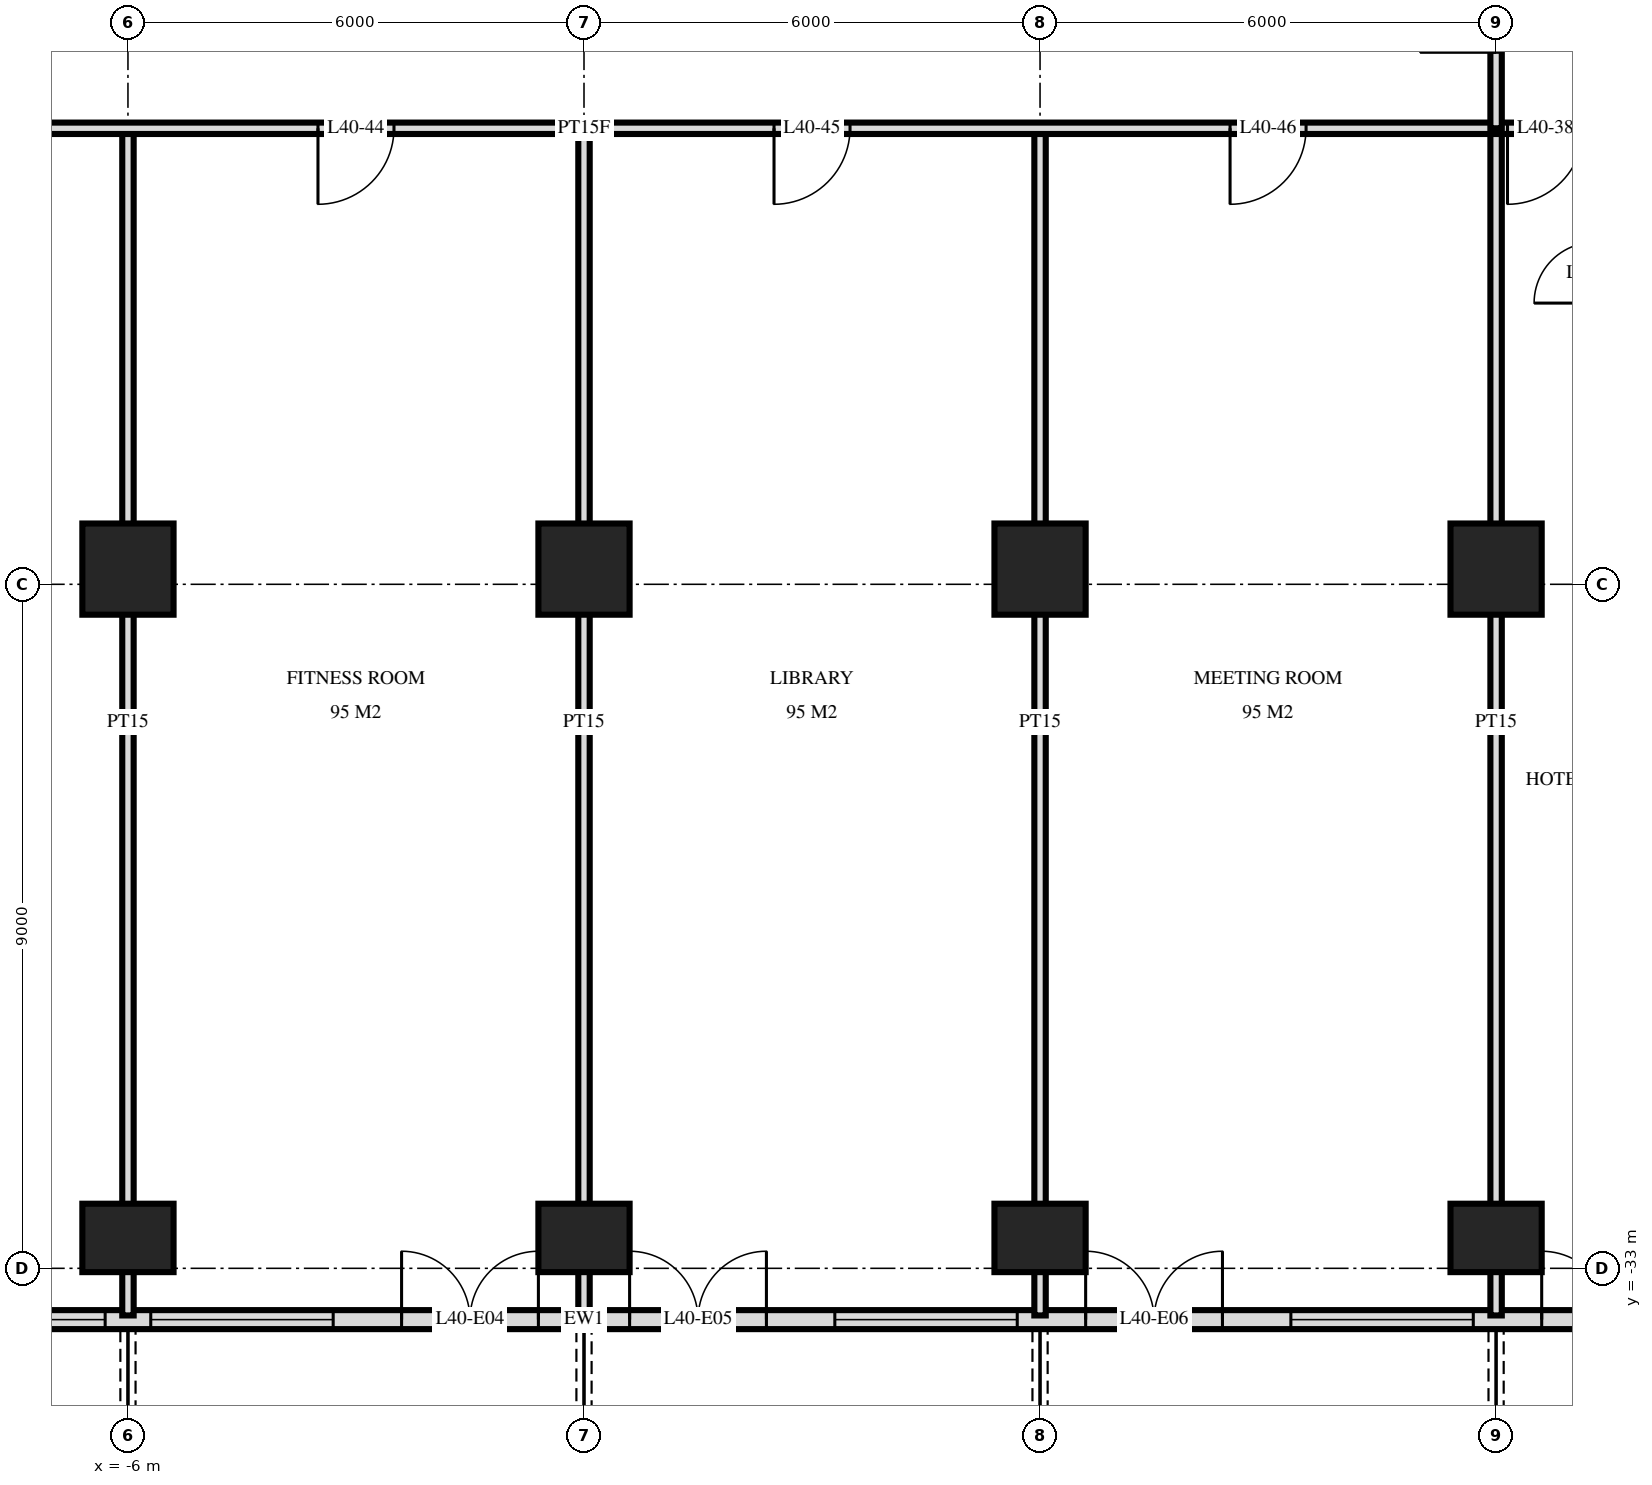
"""IFC4 building model, lengths in metres.
Left out: names, types, materials, properties, quantities, classifications, styles, units other than length and angle.
Written with IfcOpenShell. Run it as: python <this file> out.ifc"""

import sys

from ifc_helpers import new_model, si_unit, direction, frame, frame_2d, origin, origin_2d, place, context, subcontext, project, spatial, rectangle, extrude, element, fill, save


model = new_model("IFC4")
c1 = context("Model", 3, precision=1e-05, world=origin(), true_north=direction((0.0, 1.0)))
c2 = subcontext(c1, "Body", "Model", "MODEL_VIEW")
j1 = project(units=[si_unit("LENGTHUNIT", "METRE"), si_unit("PLANEANGLEUNIT", "RADIAN")], contexts=[c1])
p1 = place(None, origin())
s1 = spatial("IfcSite", under=j1, at=p1, CompositionType="ELEMENT")
p2 = place(p1, origin())
s2 = spatial("IfcBuilding", under=s1, at=p2, CompositionType="ELEMENT")
p3 = place(p2, frame((0.0, 0.0, 156.0)))
s3 = spatial("IfcBuildingStorey", under=s2, at=p3, CompositionType="ELEMENT", Elevation=156.0)
p4 = place(p3, frame((-6.0, -32.6, 0.0), z_axis=(0.0, 0.0, 1.0), x_axis=(1.0, 0.0, 0.0)))
e1 = element("IfcColumn", 1, at=p4, inside=s3, PredefinedType="COLUMN", context=c2, shape_type="SweptSolid", body=[
    extrude(rectangle(XDim=1.2, YDim=0.9, at=origin_2d()), origin(), (0.0, 0.0, 1.0), 3.6),
])
p5 = place(p3, frame((-6.0, -23.8, 0.0), z_axis=(0.0, 0.0, 1.0), x_axis=(1.0, 0.0, 0.0)))
e2 = element("IfcColumn", 2, at=p5, inside=s3, PredefinedType="COLUMN", context=c2, shape_type="SweptSolid", body=[
    extrude(rectangle(XDim=1.2, YDim=1.2, at=origin_2d()), origin(), (0.0, 0.0, 1.0), 3.6),
])
p6 = place(p3, frame((0.0, -32.6, 0.0), z_axis=(0.0, 0.0, 1.0), x_axis=(1.0, 0.0, 0.0)))
e3 = element("IfcColumn", 3, at=p6, inside=s3, PredefinedType="COLUMN", context=c2, shape_type="SweptSolid", body=[
    extrude(rectangle(XDim=1.2, YDim=0.9, at=origin_2d()), origin(), (0.0, 0.0, 1.0), 3.6),
])
p7 = place(p3, frame((0.0, -23.8, 0.0), z_axis=(0.0, 0.0, 1.0), x_axis=(1.0, 0.0, 0.0)))
e4 = element("IfcColumn", 4, at=p7, inside=s3, PredefinedType="COLUMN", context=c2, shape_type="SweptSolid", body=[
    extrude(rectangle(XDim=1.2, YDim=1.2, at=origin_2d()), origin(), (0.0, 0.0, 1.0), 3.6),
])
p8 = place(p3, frame((6.0, -32.6, 0.0), z_axis=(0.0, 0.0, 1.0), x_axis=(1.0, 0.0, 0.0)))
e5 = element("IfcColumn", 5, at=p8, inside=s3, PredefinedType="COLUMN", context=c2, shape_type="SweptSolid", body=[
    extrude(rectangle(XDim=1.2, YDim=0.9, at=origin_2d()), origin(), (0.0, 0.0, 1.0), 3.6),
])
p9 = place(p3, frame((6.0, -23.8, 0.0), z_axis=(0.0, 0.0, 1.0), x_axis=(1.0, 0.0, 0.0)))
e6 = element("IfcColumn", 6, at=p9, inside=s3, PredefinedType="COLUMN", context=c2, shape_type="SweptSolid", body=[
    extrude(rectangle(XDim=1.2, YDim=1.2, at=origin_2d()), origin(), (0.0, 0.0, 1.0), 3.6),
])
p10 = place(p3, frame((12.0, -32.6, 0.0), z_axis=(0.0, 0.0, 1.0), x_axis=(1.0, 0.0, 0.0)))
e7 = element("IfcColumn", 7, at=p10, inside=s3, PredefinedType="COLUMN", context=c2, shape_type="SweptSolid", body=[
    extrude(rectangle(XDim=1.2, YDim=0.9, at=origin_2d()), origin(), (0.0, 0.0, 1.0), 3.6),
])
p11 = place(p3, frame((12.0, -23.8, 0.0), z_axis=(0.0, 0.0, 1.0), x_axis=(1.0, 0.0, 0.0)))
e8 = element("IfcColumn", 8, at=p11, inside=s3, PredefinedType="COLUMN", context=c2, shape_type="SweptSolid", body=[
    extrude(rectangle(XDim=1.2, YDim=1.2, at=origin_2d()), origin(), (0.0, 0.0, 1.0), 3.6),
])
p12 = place(p3, frame((-23.675, -33.675, 0.0), z_axis=(0.0, 0.0, 1.0), x_axis=(1.0, 0.0, 0.0)))
e9 = element("IfcWall", 9, at=p12, inside=s3, PredefinedType="SOLIDWALL", context=c2, shape_type="SweptSolid", body=[
    extrude(rectangle(XDim=47.351, YDim=0.25, at=frame_2d((23.675, 0.0))), origin(), (0.0, 0.0, 1.0), 3.32),
])
p13 = place(p12, frame((0.275, 0.0, 0.3)))
e10 = element("IfcOpeningElement", 10, at=p13, cuts=e9, PredefinedType="OPENING", context=c2, shape_type="SweptSolid", body=[
    extrude(rectangle(XDim=2.4, YDim=2.1, at=frame_2d((1.2, 1.05))), frame((0.0, 0.135, 0.0), z_axis=(0.0, -1.0, 0.0), x_axis=(1.0, 0.0, 0.0)), (0.0, 0.0, 1.0), 0.27),
])
p14 = place(p12, frame((3.425, 0.0, 0.0)))
e11 = element("IfcOpeningElement", 11, at=p14, cuts=e9, PredefinedType="OPENING", context=c2, shape_type="SweptSolid", body=[
    extrude(rectangle(XDim=1.8, YDim=2.4, at=frame_2d((0.9, 1.2))), frame((0.0, 0.135, 0.0), z_axis=(0.0, -1.0, 0.0), x_axis=(1.0, 0.0, 0.0)), (0.0, 0.0, 1.0), 0.27),
])
p15 = place(p12, frame((7.775, 0.0, 0.0)))
e12 = element("IfcOpeningElement", 12, at=p15, cuts=e9, PredefinedType="OPENING", context=c2, shape_type="SweptSolid", body=[
    extrude(rectangle(XDim=1.8, YDim=2.4, at=frame_2d((0.9, 1.2))), frame((0.0, 0.135, 0.0), z_axis=(0.0, -1.0, 0.0), x_axis=(1.0, 0.0, 0.0)), (0.0, 0.0, 1.0), 0.27),
])
p16 = place(p12, frame((12.275, 0.0, 0.0)))
e13 = element("IfcOpeningElement", 13, at=p16, cuts=e9, PredefinedType="OPENING", context=c2, shape_type="SweptSolid", body=[
    extrude(rectangle(XDim=1.8, YDim=2.4, at=frame_2d((0.9, 1.2))), frame((0.0, 0.135, 0.0), z_axis=(0.0, -1.0, 0.0), x_axis=(1.0, 0.0, 0.0)), (0.0, 0.0, 1.0), 0.27),
])
p17 = place(p12, frame((14.975, 0.0, 0.3)))
e14 = element("IfcOpeningElement", 14, at=p17, cuts=e9, PredefinedType="OPENING", context=c2, shape_type="SweptSolid", body=[
    extrude(rectangle(XDim=2.4, YDim=2.1, at=frame_2d((1.2, 1.05))), frame((0.0, 0.135, 0.0), z_axis=(0.0, -1.0, 0.0), x_axis=(1.0, 0.0, 0.0)), (0.0, 0.0, 1.0), 0.27),
])
p18 = place(p12, frame((17.975, 0.0, 0.3)))
e15 = element("IfcOpeningElement", 15, at=p18, cuts=e9, PredefinedType="OPENING", context=c2, shape_type="SweptSolid", body=[
    extrude(rectangle(XDim=2.4, YDim=2.1, at=frame_2d((1.2, 1.05))), frame((0.0, 0.135, 0.0), z_axis=(0.0, -1.0, 0.0), x_axis=(1.0, 0.0, 0.0)), (0.0, 0.0, 1.0), 0.27),
])
p19 = place(p12, frame((21.275, 0.0, 0.0)))
e16 = element("IfcOpeningElement", 16, at=p19, cuts=e9, PredefinedType="OPENING", context=c2, shape_type="SweptSolid", body=[
    extrude(rectangle(XDim=1.8, YDim=2.4, at=frame_2d((0.9, 1.2))), frame((0.0, 0.135, 0.0), z_axis=(0.0, -1.0, 0.0), x_axis=(1.0, 0.0, 0.0)), (0.0, 0.0, 1.0), 0.27),
])
p20 = place(p12, frame((24.275, 0.0, 0.0)))
e17 = element("IfcOpeningElement", 17, at=p20, cuts=e9, PredefinedType="OPENING", context=c2, shape_type="SweptSolid", body=[
    extrude(rectangle(XDim=1.8, YDim=2.4, at=frame_2d((0.9, 1.2))), frame((0.0, 0.135, 0.0), z_axis=(0.0, -1.0, 0.0), x_axis=(1.0, 0.0, 0.0)), (0.0, 0.0, 1.0), 0.27),
])
p21 = place(p12, frame((26.975, 0.0, 0.3)))
e18 = element("IfcOpeningElement", 18, at=p21, cuts=e9, PredefinedType="OPENING", context=c2, shape_type="SweptSolid", body=[
    extrude(rectangle(XDim=2.4, YDim=2.1, at=frame_2d((1.2, 1.05))), frame((0.0, 0.135, 0.0), z_axis=(0.0, -1.0, 0.0), x_axis=(1.0, 0.0, 0.0)), (0.0, 0.0, 1.0), 0.27),
])
p22 = place(p12, frame((30.275, 0.0, 0.0)))
e19 = element("IfcOpeningElement", 19, at=p22, cuts=e9, PredefinedType="OPENING", context=c2, shape_type="SweptSolid", body=[
    extrude(rectangle(XDim=1.8, YDim=2.4, at=frame_2d((0.9, 1.2))), frame((0.0, 0.135, 0.0), z_axis=(0.0, -1.0, 0.0), x_axis=(1.0, 0.0, 0.0)), (0.0, 0.0, 1.0), 0.27),
])
p23 = place(p12, frame((32.975, 0.0, 0.3)))
e20 = element("IfcOpeningElement", 20, at=p23, cuts=e9, PredefinedType="OPENING", context=c2, shape_type="SweptSolid", body=[
    extrude(rectangle(XDim=2.4, YDim=2.1, at=frame_2d((1.2, 1.05))), frame((0.0, 0.135, 0.0), z_axis=(0.0, -1.0, 0.0), x_axis=(1.0, 0.0, 0.0)), (0.0, 0.0, 1.0), 0.27),
])
p24 = place(p12, frame((36.275, 0.0, 0.0)))
e21 = element("IfcOpeningElement", 21, at=p24, cuts=e9, PredefinedType="OPENING", context=c2, shape_type="SweptSolid", body=[
    extrude(rectangle(XDim=1.8, YDim=2.4, at=frame_2d((0.9, 1.2))), frame((0.0, 0.135, 0.0), z_axis=(0.0, -1.0, 0.0), x_axis=(1.0, 0.0, 0.0)), (0.0, 0.0, 1.0), 0.27),
])
p25 = place(p12, frame((38.975, 0.0, 0.3)))
e22 = element("IfcOpeningElement", 22, at=p25, cuts=e9, PredefinedType="OPENING", context=c2, shape_type="SweptSolid", body=[
    extrude(rectangle(XDim=2.4, YDim=2.1, at=frame_2d((1.2, 1.05))), frame((0.0, 0.135, 0.0), z_axis=(0.0, -1.0, 0.0), x_axis=(1.0, 0.0, 0.0)), (0.0, 0.0, 1.0), 0.27),
])
p26 = place(p12, frame((41.975, 0.0, 0.3)))
e23 = element("IfcOpeningElement", 23, at=p26, cuts=e9, PredefinedType="OPENING", context=c2, shape_type="SweptSolid", body=[
    extrude(rectangle(XDim=2.4, YDim=2.1, at=frame_2d((1.2, 1.05))), frame((0.0, 0.135, 0.0), z_axis=(0.0, -1.0, 0.0), x_axis=(1.0, 0.0, 0.0)), (0.0, 0.0, 1.0), 0.27),
])
p27 = place(p12, frame((45.125, 0.0, 0.0)))
e24 = element("IfcOpeningElement", 24, at=p27, cuts=e9, PredefinedType="OPENING", context=c2, shape_type="SweptSolid", body=[
    extrude(rectangle(XDim=1.8, YDim=2.4, at=frame_2d((0.9, 1.2))), frame((0.0, 0.135, 0.0), z_axis=(0.0, -1.0, 0.0), x_axis=(1.0, 0.0, 0.0)), (0.0, 0.0, 1.0), 0.27),
])
p28 = place(p3, frame((12.0, -18.0, 0.0), z_axis=(0.0, 0.0, 1.0), x_axis=(0.0, 1.0, 0.0)))
e25 = element("IfcWall", 25, at=p28, inside=s3, PredefinedType="PARTITIONING", context=c2, shape_type="SweptSolid", body=[
    extrude(rectangle(XDim=2.95, YDim=0.15, at=frame_2d((1.475, 0.0))), origin(), (0.0, 0.0, 1.0), 3.32),
])
p29 = place(p28, frame((1.0, 0.0, 0.0)))
e26 = element("IfcOpeningElement", 26, at=p29, cuts=e25, PredefinedType="OPENING", context=c2, shape_type="SweptSolid", body=[
    extrude(rectangle(XDim=1.0, YDim=2.1, at=frame_2d((0.5, 1.05))), frame((0.0, 0.085, 0.0), z_axis=(0.0, -1.0, 0.0), x_axis=(1.0, 0.0, 0.0)), (0.0, 0.0, 1.0), 0.17),
])
for number, where, z_axis, x_axis in (
    (27, (12.0, -33.62, 0.0), (0.0, 0.0, 1.0), (0.0, 1.0, 0.0)),
    (28, (6.0, -33.62, 0.0), (0.0, 0.0, 1.0), (0.0, 1.0, 0.0)),
    (29, (0.0, -33.62, 0.0), (0.0, 0.0, 1.0), (0.0, 1.0, 0.0)),
    (30, (-6.0, -33.62, 0.0), (0.0, 0.0, 1.0), (0.0, 1.0, 0.0)),
):
    element("IfcWall", number, at=place(p3, frame(where, z_axis=z_axis, x_axis=x_axis)), inside=s3, PredefinedType="PARTITIONING", context=c2, shape_type="SweptSolid", body=[
        extrude(rectangle(XDim=15.62, YDim=0.15, at=frame_2d((7.81, 0.0))), origin(), (0.0, 0.0, 1.0), 3.32),
    ])
p30 = place(p3, frame((-28.02, -18.0, 0.0), z_axis=(0.0, 0.0, 1.0), x_axis=(1.0, 0.0, 0.0)))
e31 = element("IfcWall", 31, at=p30, inside=s3, PredefinedType="PARTITIONING", context=c2, shape_type="SweptSolid", body=[
    extrude(rectangle(XDim=56.04, YDim=0.15, at=frame_2d((28.02, 0.0))), origin(), (0.0, 0.0, 1.0), 3.32),
])
p31 = place(p30, frame((12.52, 0.0, 0.0)))
e32 = element("IfcOpeningElement", 32, at=p31, cuts=e31, PredefinedType="OPENING", context=c2, shape_type="SweptSolid", body=[
    extrude(rectangle(XDim=1.0, YDim=2.1, at=frame_2d((0.5, 1.05))), frame((0.0, 0.085, 0.0), z_axis=(0.0, -1.0, 0.0), x_axis=(1.0, 0.0, 0.0)), (0.0, 0.0, 1.0), 0.17),
])
p32 = place(p30, frame((8.32, 0.0, 0.0)))
e33 = element("IfcOpeningElement", 33, at=p32, cuts=e31, PredefinedType="OPENING", context=c2, shape_type="SweptSolid", body=[
    extrude(rectangle(XDim=1.0, YDim=2.1, at=frame_2d((0.5, 1.05))), frame((0.0, 0.085, 0.0), z_axis=(0.0, -1.0, 0.0), x_axis=(1.0, 0.0, 0.0)), (0.0, 0.0, 1.0), 0.17),
])
p33 = place(p30, frame((40.17, 0.0, 0.0)))
e34 = element("IfcOpeningElement", 34, at=p33, cuts=e31, PredefinedType="OPENING", context=c2, shape_type="SweptSolid", body=[
    extrude(rectangle(XDim=1.0, YDim=2.1, at=frame_2d((0.5, 1.05))), frame((0.0, 0.085, 0.0), z_axis=(0.0, -1.0, 0.0), x_axis=(1.0, 0.0, 0.0)), (0.0, 0.0, 1.0), 0.17),
])
p34 = place(p30, frame((44.87, 0.0, 0.0)))
e35 = element("IfcOpeningElement", 35, at=p34, cuts=e31, PredefinedType="OPENING", context=c2, shape_type="SweptSolid", body=[
    extrude(rectangle(XDim=1.0, YDim=2.1, at=frame_2d((0.5, 1.05))), frame((0.0, 0.085, 0.0), z_axis=(0.0, -1.0, 0.0), x_axis=(1.0, 0.0, 0.0)), (0.0, 0.0, 1.0), 0.17),
])
p35 = place(p30, frame((46.72, 0.0, 0.0)))
e36 = element("IfcOpeningElement", 36, at=p35, cuts=e31, PredefinedType="OPENING", context=c2, shape_type="SweptSolid", body=[
    extrude(rectangle(XDim=1.0, YDim=2.1, at=frame_2d((0.5, 1.05))), frame((0.0, 0.085, 0.0), z_axis=(0.0, -1.0, 0.0), x_axis=(1.0, 0.0, 0.0)), (0.0, 0.0, 1.0), 0.17),
])
p36 = place(p30, frame((18.52, 0.0, 0.0)))
e37 = element("IfcOpeningElement", 37, at=p36, cuts=e31, PredefinedType="OPENING", context=c2, shape_type="SweptSolid", body=[
    extrude(rectangle(XDim=1.0, YDim=2.1, at=frame_2d((0.5, 1.05))), frame((0.0, 0.085, 0.0), z_axis=(0.0, -1.0, 0.0), x_axis=(1.0, 0.0, 0.0)), (0.0, 0.0, 1.0), 0.17),
])
p37 = place(p30, frame((24.52, 0.0, 0.0)))
e38 = element("IfcOpeningElement", 38, at=p37, cuts=e31, PredefinedType="OPENING", context=c2, shape_type="SweptSolid", body=[
    extrude(rectangle(XDim=1.0, YDim=2.1, at=frame_2d((0.5, 1.05))), frame((0.0, 0.085, 0.0), z_axis=(0.0, -1.0, 0.0), x_axis=(1.0, 0.0, 0.0)), (0.0, 0.0, 1.0), 0.17),
])
p38 = place(p30, frame((30.52, 0.0, 0.0)))
e39 = element("IfcOpeningElement", 39, at=p38, cuts=e31, PredefinedType="OPENING", context=c2, shape_type="SweptSolid", body=[
    extrude(rectangle(XDim=1.0, YDim=2.1, at=frame_2d((0.5, 1.05))), frame((0.0, 0.085, 0.0), z_axis=(0.0, -1.0, 0.0), x_axis=(1.0, 0.0, 0.0)), (0.0, 0.0, 1.0), 0.17),
])
p39 = place(p30, frame((36.52, 0.0, 0.0)))
e40 = element("IfcOpeningElement", 40, at=p39, cuts=e31, PredefinedType="OPENING", context=c2, shape_type="SweptSolid", body=[
    extrude(rectangle(XDim=1.0, YDim=2.1, at=frame_2d((0.5, 1.05))), frame((0.0, 0.085, 0.0), z_axis=(0.0, -1.0, 0.0), x_axis=(1.0, 0.0, 0.0)), (0.0, 0.0, 1.0), 0.17),
])
p40 = place(p17, origin())
e41 = element("IfcWindow", 41, at=p40, inside=s3, PartitioningType="SINGLE_PANEL", PredefinedType="WINDOW", context=c2, shape_type="SweptSolid", body=[
    extrude(rectangle(XDim=2.4, YDim=2.1, at=frame_2d((1.2, 1.05))), frame((0.0, 0.03, 0.0), z_axis=(0.0, -1.0, 0.0), x_axis=(1.0, 0.0, 0.0)), (0.0, 0.0, 1.0), 0.06),
])
fill(e14, e41)
p41 = place(p18, origin())
e42 = element("IfcWindow", 42, at=p41, inside=s3, PartitioningType="SINGLE_PANEL", PredefinedType="WINDOW", context=c2, shape_type="SweptSolid", body=[
    extrude(rectangle(XDim=2.4, YDim=2.1, at=frame_2d((1.2, 1.05))), frame((0.0, 0.03, 0.0), z_axis=(0.0, -1.0, 0.0), x_axis=(1.0, 0.0, 0.0)), (0.0, 0.0, 1.0), 0.06),
])
fill(e15, e42)
p42 = place(p19, origin())
e43 = element("IfcDoor", 43, at=p42, inside=s3, OperationType="DOUBLE_DOOR_SINGLE_SWING", PredefinedType="DOOR", context=c2, shape_type="SweptSolid", body=[
    extrude(rectangle(XDim=1.8, YDim=2.4, at=frame_2d((0.9, 1.2))), frame((0.0, 0.025, 0.0), z_axis=(0.0, -1.0, 0.0), x_axis=(1.0, 0.0, 0.0)), (0.0, 0.0, 1.0), 0.05),
])
fill(e16, e43)
p43 = place(p20, origin())
e44 = element("IfcDoor", 44, at=p43, inside=s3, OperationType="DOUBLE_DOOR_SINGLE_SWING", PredefinedType="DOOR", context=c2, shape_type="SweptSolid", body=[
    extrude(rectangle(XDim=1.8, YDim=2.4, at=frame_2d((0.9, 1.2))), frame((0.0, 0.025, 0.0), z_axis=(0.0, -1.0, 0.0), x_axis=(1.0, 0.0, 0.0)), (0.0, 0.0, 1.0), 0.05),
])
fill(e17, e44)
p44 = place(p21, origin())
e45 = element("IfcWindow", 45, at=p44, inside=s3, PartitioningType="SINGLE_PANEL", PredefinedType="WINDOW", context=c2, shape_type="SweptSolid", body=[
    extrude(rectangle(XDim=2.4, YDim=2.1, at=frame_2d((1.2, 1.05))), frame((0.0, 0.03, 0.0), z_axis=(0.0, -1.0, 0.0), x_axis=(1.0, 0.0, 0.0)), (0.0, 0.0, 1.0), 0.06),
])
fill(e18, e45)
p45 = place(p22, origin())
e46 = element("IfcDoor", 46, at=p45, inside=s3, OperationType="DOUBLE_DOOR_SINGLE_SWING", PredefinedType="DOOR", context=c2, shape_type="SweptSolid", body=[
    extrude(rectangle(XDim=1.8, YDim=2.4, at=frame_2d((0.9, 1.2))), frame((0.0, 0.025, 0.0), z_axis=(0.0, -1.0, 0.0), x_axis=(1.0, 0.0, 0.0)), (0.0, 0.0, 1.0), 0.05),
])
fill(e19, e46)
p46 = place(p23, origin())
e47 = element("IfcWindow", 47, at=p46, inside=s3, PartitioningType="SINGLE_PANEL", PredefinedType="WINDOW", context=c2, shape_type="SweptSolid", body=[
    extrude(rectangle(XDim=2.4, YDim=2.1, at=frame_2d((1.2, 1.05))), frame((0.0, 0.03, 0.0), z_axis=(0.0, -1.0, 0.0), x_axis=(1.0, 0.0, 0.0)), (0.0, 0.0, 1.0), 0.06),
])
fill(e20, e47)
p47 = place(p24, origin())
e48 = element("IfcDoor", 48, at=p47, inside=s3, OperationType="DOUBLE_DOOR_SINGLE_SWING", PredefinedType="DOOR", context=c2, shape_type="SweptSolid", body=[
    extrude(rectangle(XDim=1.8, YDim=2.4, at=frame_2d((0.9, 1.2))), frame((0.0, 0.025, 0.0), z_axis=(0.0, -1.0, 0.0), x_axis=(1.0, 0.0, 0.0)), (0.0, 0.0, 1.0), 0.05),
])
fill(e21, e48)
p48 = place(p33, frame((0.5, 0.0, 0.0), z_axis=(0.0, 0.0, 1.0), x_axis=(-1.0, 0.0, 0.0)))
e49 = element("IfcDoor", 49, at=p48, inside=s3, OperationType="SINGLE_SWING_LEFT", PredefinedType="DOOR", context=c2, shape_type="SweptSolid", body=[
    extrude(rectangle(XDim=1.0, YDim=2.1, at=frame_2d((0.0, 1.05))), frame((0.0, -0.025, 0.0), z_axis=(0.0, 1.0, 0.0), x_axis=(-1.0, 0.0, 0.0)), (0.0, 0.0, 1.0), 0.05),
])
fill(e34, e49)
p49 = place(p37, frame((0.5, 0.0, 0.0), z_axis=(0.0, 0.0, 1.0), x_axis=(-1.0, 0.0, 0.0)))
e50 = element("IfcDoor", 50, at=p49, inside=s3, OperationType="SINGLE_SWING_LEFT", PredefinedType="DOOR", context=c2, shape_type="SweptSolid", body=[
    extrude(rectangle(XDim=1.0, YDim=2.1, at=frame_2d((0.0, 1.05))), frame((0.0, -0.025, 0.0), z_axis=(0.0, 1.0, 0.0), x_axis=(-1.0, 0.0, 0.0)), (0.0, 0.0, 1.0), 0.05),
])
fill(e38, e50)
p50 = place(p38, frame((0.5, 0.0, 0.0), z_axis=(0.0, 0.0, 1.0), x_axis=(-1.0, 0.0, 0.0)))
e51 = element("IfcDoor", 51, at=p50, inside=s3, OperationType="SINGLE_SWING_LEFT", PredefinedType="DOOR", context=c2, shape_type="SweptSolid", body=[
    extrude(rectangle(XDim=1.0, YDim=2.1, at=frame_2d((0.0, 1.05))), frame((0.0, -0.025, 0.0), z_axis=(0.0, 1.0, 0.0), x_axis=(-1.0, 0.0, 0.0)), (0.0, 0.0, 1.0), 0.05),
])
fill(e39, e51)
p51 = place(p39, frame((0.5, 0.0, 0.0), z_axis=(0.0, 0.0, 1.0), x_axis=(-1.0, 0.0, 0.0)))
e52 = element("IfcDoor", 52, at=p51, inside=s3, OperationType="SINGLE_SWING_LEFT", PredefinedType="DOOR", context=c2, shape_type="SweptSolid", body=[
    extrude(rectangle(XDim=1.0, YDim=2.1, at=frame_2d((0.0, 1.05))), frame((0.0, -0.025, 0.0), z_axis=(0.0, 1.0, 0.0), x_axis=(-1.0, 0.0, 0.0)), (0.0, 0.0, 1.0), 0.05),
])
fill(e40, e52)
save(model, sys.argv[1])
